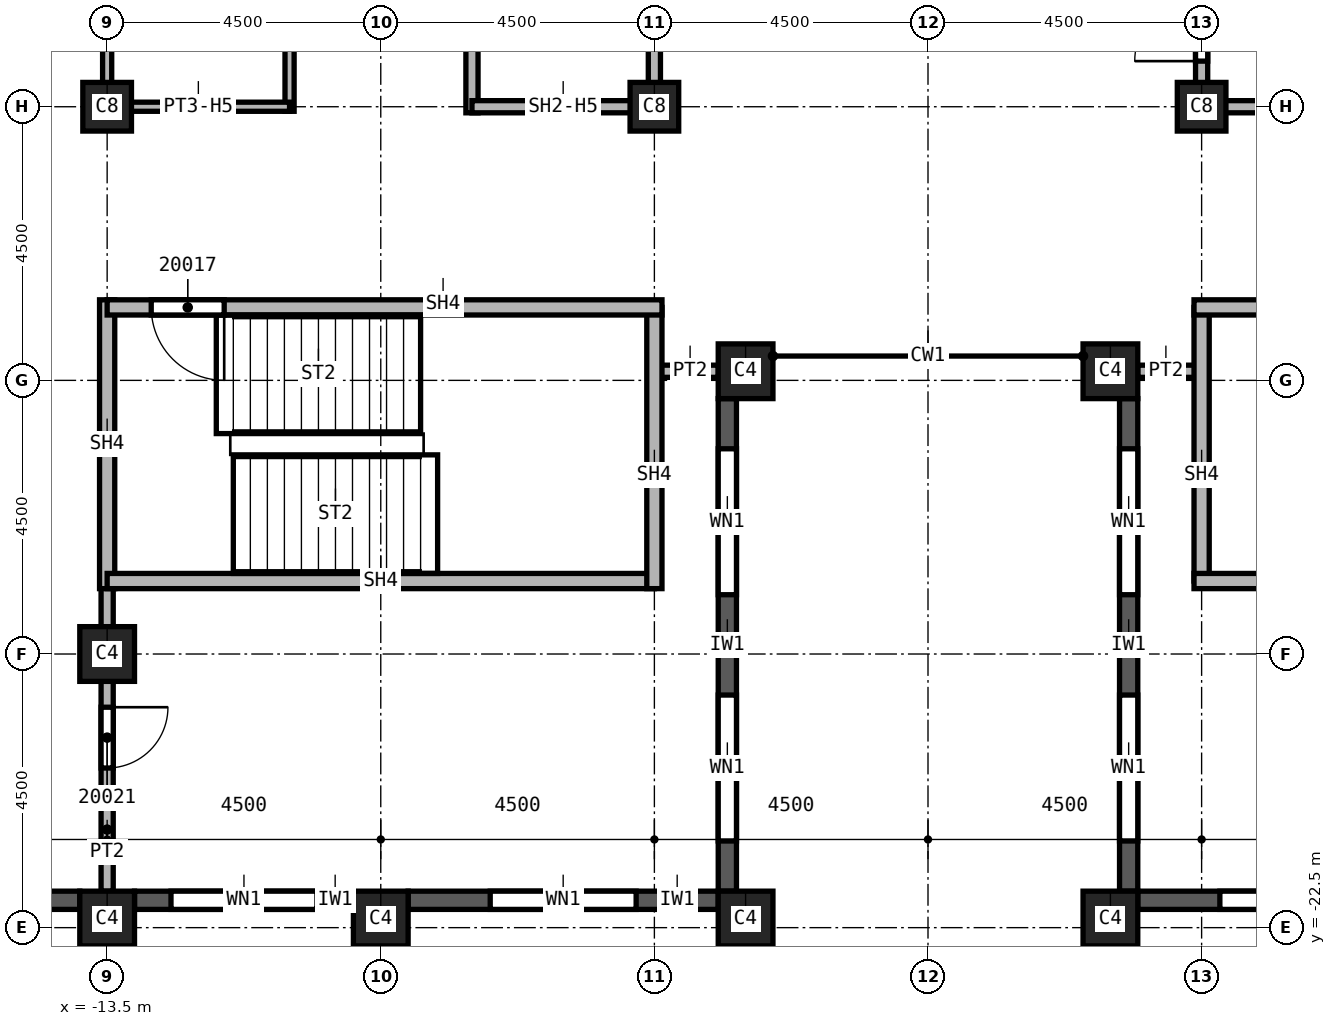
"""IFC4 building model, lengths in metres.
Left out: names, types, materials, properties, quantities, classifications, styles, units other than length and angle.
Written with IfcOpenShell. Run it as: python <this file> out.ifc"""

import sys

from ifc_helpers import new_model, si_unit, direction, frame, frame_2d, origin, origin_2d, place, context, subcontext, project, spatial, rectangle, extrude, element, fill, save


model = new_model("IFC4")
c1 = context("Model", 3, precision=1e-05, world=origin(), true_north=direction((0.0, 1.0)))
c2 = subcontext(c1, "Body", "Model", "MODEL_VIEW")
j1 = project(units=[si_unit("LENGTHUNIT", "METRE"), si_unit("PLANEANGLEUNIT", "RADIAN")], contexts=[c1])
p1 = place(None, origin())
s1 = spatial("IfcSite", under=j1, at=p1, CompositionType="ELEMENT")
p2 = place(p1, origin())
s2 = spatial("IfcBuilding", under=s1, at=p2, CompositionType="ELEMENT")
p3 = place(p2, frame((0.0, 0.0, 290.0)))
s3 = spatial("IfcBuildingStorey", under=s2, at=p3, CompositionType="ELEMENT", Elevation=290.0)
p4 = place(p3, frame((-13.5, -18.0, 0.0), z_axis=(0.0, 0.0, 1.0), x_axis=(1.0, 0.0, 0.0)))
e1 = element("IfcColumn", 1, at=p4, inside=s3, PredefinedType="COLUMN", context=c2, shape_type="SweptSolid", body=[
    extrude(rectangle(XDim=0.9, YDim=0.9, at=origin_2d()), origin(), (0.0, 0.0, 1.0), 3.59),
])
for number, where, z_axis, x_axis in (
    (2, (4.5, -9.0, 0.0), (0.0, 0.0, 1.0), (1.0, 0.0, 0.0)),
    (3, (-4.5, -9.0, 0.0), (0.0, 0.0, 1.0), (1.0, 0.0, 0.0)),
    (4, (-13.5, -9.0, 0.0), (0.0, 0.0, 1.0), (1.0, 0.0, 0.0)),
):
    element("IfcColumn", number, at=place(p3, frame(where, z_axis=z_axis, x_axis=x_axis)), inside=s3, PredefinedType="COLUMN", context=c2, shape_type="SweptSolid", body=[
        extrude(rectangle(XDim=0.8, YDim=0.8, at=origin_2d()), origin(), (0.0, 0.0, 1.0), 3.59),
    ])
for number, where, z_axis, x_axis in (
    (5, (3.0, -22.35, 0.0), (0.0, 0.0, 1.0), (1.0, 0.0, 0.0)),
    (6, (-3.0, -22.35, 0.0), (0.0, 0.0, 1.0), (1.0, 0.0, 0.0)),
    (7, (-9.0, -22.35, 0.0), (0.0, 0.0, 1.0), (1.0, 0.0, 0.0)),
    (8, (-13.5, -22.35, 0.0), (0.0, 0.0, 1.0), (1.0, 0.0, 0.0)),
    (9, (3.0, -13.35, 0.0), (0.0, 0.0, 1.0), (1.0, 0.0, 0.0)),
    (10, (-3.0, -13.35, 0.0), (0.0, 0.0, 1.0), (1.0, 0.0, 0.0)),
):
    element("IfcColumn", number, at=place(p3, frame(where, z_axis=z_axis, x_axis=x_axis)), inside=s3, PredefinedType="COLUMN", context=c2, shape_type="SweptSolid", body=[
        extrude(rectangle(XDim=0.9, YDim=0.9, at=origin_2d()), origin(), (0.0, 0.0, 1.0), 3.59),
    ])
p5 = place(p3, frame((-17.55, -22.05, 0.0), z_axis=(0.0, 0.0, 1.0), x_axis=(1.0, 0.0, 0.0)))
e11 = element("IfcWall", 11, at=p5, inside=s3, PredefinedType="SOLIDWALL", context=c2, shape_type="SweptSolid", body=[
    extrude(rectangle(XDim=3.6, YDim=0.3, at=frame_2d((1.8, 0.0))), origin(), (0.0, 0.0, 1.0), 2.99),
])
p6 = place(p5, frame((0.775, 0.0, 0.8)))
e12 = element("IfcOpeningElement", 12, at=p6, cuts=e11, PredefinedType="OPENING", context=c2, shape_type="SweptSolid", body=[
    extrude(rectangle(XDim=1.0, YDim=1.95, at=frame_2d((0.5, 0.975))), frame((0.0, 0.15, 0.0), z_axis=(0.0, -1.0, 0.0), x_axis=(1.0, 0.0, 0.0)), (0.0, 0.0, 1.0), 0.3),
])
p7 = place(p5, frame((2.375, 0.0, 0.8)))
e13 = element("IfcOpeningElement", 13, at=p7, cuts=e11, PredefinedType="OPENING", context=c2, shape_type="SweptSolid", body=[
    extrude(rectangle(XDim=0.6, YDim=1.95, at=frame_2d((0.3, 0.975))), frame((0.0, 0.15, 0.0), z_axis=(0.0, -1.0, 0.0), x_axis=(1.0, 0.0, 0.0)), (0.0, 0.0, 1.0), 0.3),
])
p8 = place(p3, frame((-13.05, -22.05, 0.0), z_axis=(0.0, 0.0, 1.0), x_axis=(1.0, 0.0, 0.0)))
e14 = element("IfcWall", 14, at=p8, inside=s3, PredefinedType="SOLIDWALL", context=c2, shape_type="SweptSolid", body=[
    extrude(rectangle(XDim=3.6, YDim=0.3, at=frame_2d((1.8, 0.0))), origin(), (0.0, 0.0, 1.0), 2.99),
])
p9 = place(p8, frame((0.6, 0.0, 0.8)))
e15 = element("IfcOpeningElement", 15, at=p9, cuts=e14, PredefinedType="OPENING", context=c2, shape_type="SweptSolid", body=[
    extrude(rectangle(XDim=2.4, YDim=1.95, at=frame_2d((1.2, 0.975))), frame((0.0, 0.15, 0.0), z_axis=(0.0, -1.0, 0.0), x_axis=(1.0, 0.0, 0.0)), (0.0, 0.0, 1.0), 0.3),
])
p10 = place(p3, frame((-8.55, -22.05, 0.0), z_axis=(0.0, 0.0, 1.0), x_axis=(1.0, 0.0, 0.0)))
e16 = element("IfcWall", 16, at=p10, inside=s3, PredefinedType="SOLIDWALL", context=c2, shape_type="SweptSolid", body=[
    extrude(rectangle(XDim=5.1, YDim=0.3, at=frame_2d((2.55, 0.0))), origin(), (0.0, 0.0, 1.0), 2.99),
])
p11 = place(p10, frame((1.35, 0.0, 0.8)))
e17 = element("IfcOpeningElement", 17, at=p11, cuts=e16, PredefinedType="OPENING", context=c2, shape_type="SweptSolid", body=[
    extrude(rectangle(XDim=2.4, YDim=1.95, at=frame_2d((1.2, 0.975))), frame((0.0, 0.15, 0.0), z_axis=(0.0, -1.0, 0.0), x_axis=(1.0, 0.0, 0.0)), (0.0, 0.0, 1.0), 0.3),
])
p12 = place(p3, frame((-3.3, -21.9, 0.0), z_axis=(0.0, 0.0, 1.0), x_axis=(0.0, 1.0, 0.0)))
e18 = element("IfcWall", 18, at=p12, inside=s3, PredefinedType="SOLIDWALL", context=c2, shape_type="SweptSolid", body=[
    extrude(rectangle(XDim=8.1, YDim=0.3, at=frame_2d((4.05, 0.0))), origin(), (0.0, 0.0, 1.0), 2.99),
])
p13 = place(p12, frame((0.825, 0.0, 0.8)))
e19 = element("IfcOpeningElement", 19, at=p13, cuts=e18, PredefinedType="OPENING", context=c2, shape_type="SweptSolid", body=[
    extrude(rectangle(XDim=2.4, YDim=1.95, at=frame_2d((1.2, 0.975))), frame((0.0, 0.15, 0.0), z_axis=(0.0, -1.0, 0.0), x_axis=(1.0, 0.0, 0.0)), (0.0, 0.0, 1.0), 0.3),
])
p14 = place(p12, frame((4.875, 0.0, 0.8)))
e20 = element("IfcOpeningElement", 20, at=p14, cuts=e18, PredefinedType="OPENING", context=c2, shape_type="SweptSolid", body=[
    extrude(rectangle(XDim=2.4, YDim=1.95, at=frame_2d((1.2, 0.975))), frame((0.0, 0.15, 0.0), z_axis=(0.0, -1.0, 0.0), x_axis=(1.0, 0.0, 0.0)), (0.0, 0.0, 1.0), 0.3),
])
p15 = place(p3, frame((3.3, -13.8, 0.0), z_axis=(0.0, 0.0, 1.0), x_axis=(0.0, -1.0, 0.0)))
e21 = element("IfcWall", 21, at=p15, inside=s3, PredefinedType="SOLIDWALL", context=c2, shape_type="SweptSolid", body=[
    extrude(rectangle(XDim=8.1, YDim=0.3, at=frame_2d((4.05, 0.0))), origin(), (0.0, 0.0, 1.0), 2.99),
])
p16 = place(p15, frame((0.825, 0.0, 0.8)))
e22 = element("IfcOpeningElement", 22, at=p16, cuts=e21, PredefinedType="OPENING", context=c2, shape_type="SweptSolid", body=[
    extrude(rectangle(XDim=2.4, YDim=1.95, at=frame_2d((1.2, 0.975))), frame((0.0, 0.15, 0.0), z_axis=(0.0, -1.0, 0.0), x_axis=(1.0, 0.0, 0.0)), (0.0, 0.0, 1.0), 0.3),
])
p17 = place(p15, frame((4.875, 0.0, 0.8)))
e23 = element("IfcOpeningElement", 23, at=p17, cuts=e21, PredefinedType="OPENING", context=c2, shape_type="SweptSolid", body=[
    extrude(rectangle(XDim=2.4, YDim=1.95, at=frame_2d((1.2, 0.975))), frame((0.0, 0.15, 0.0), z_axis=(0.0, -1.0, 0.0), x_axis=(1.0, 0.0, 0.0)), (0.0, 0.0, 1.0), 0.3),
])
p18 = place(p3, frame((3.45, -22.05, 0.0), z_axis=(0.0, 0.0, 1.0), x_axis=(1.0, 0.0, 0.0)))
e24 = element("IfcWall", 24, at=p18, inside=s3, PredefinedType="SOLIDWALL", context=c2, shape_type="SweptSolid", body=[
    extrude(rectangle(XDim=5.1, YDim=0.3, at=frame_2d((2.55, 0.0))), origin(), (0.0, 0.0, 1.0), 2.99),
])
p19 = place(p18, frame((1.35, 0.0, 0.8)))
e25 = element("IfcOpeningElement", 25, at=p19, cuts=e24, PredefinedType="OPENING", context=c2, shape_type="SweptSolid", body=[
    extrude(rectangle(XDim=2.4, YDim=1.95, at=frame_2d((1.2, 0.975))), frame((0.0, 0.15, 0.0), z_axis=(0.0, -1.0, 0.0), x_axis=(1.0, 0.0, 0.0)), (0.0, 0.0, 1.0), 0.3),
])
p20 = place(p3, frame((-13.5, -16.675, 0.0), z_axis=(0.0, 0.0, 1.0), x_axis=(0.0, -1.0, 0.0)))
e26 = element("IfcWall", 26, at=p20, inside=s3, PredefinedType="PARTITIONING", context=c2, shape_type="SweptSolid", body=[
    extrude(rectangle(XDim=5.225, YDim=0.2, at=frame_2d((2.612, 0.0))), origin(), (0.0, 0.0, 1.0), 3.59),
])
p21 = place(p20, frame((2.2, 0.0, 0.0)))
e27 = element("IfcOpeningElement", 27, at=p21, cuts=e26, PredefinedType="OPENING", context=c2, shape_type="SweptSolid", body=[
    extrude(rectangle(XDim=1.0, YDim=2.1, at=frame_2d((0.5, 1.05))), frame((0.0, 0.1, 0.0), z_axis=(0.0, -1.0, 0.0), x_axis=(1.0, 0.0, 0.0)), (0.0, 0.0, 1.0), 0.2),
])
for number, where, z_axis, x_axis in (
    (28, (-3.45, -13.35, 0.0), (0.0, 0.0, 1.0), (-1.0, 0.0, 0.0)),
    (29, (4.5, -13.35, 0.0), (0.0, 0.0, 1.0), (-1.0, 0.0, 0.0)),
):
    element("IfcWall", number, at=place(p3, frame(where, z_axis=z_axis, x_axis=x_axis)), inside=s3, PredefinedType="PARTITIONING", context=c2, shape_type="SweptSolid", body=[
        extrude(rectangle(XDim=1.05, YDim=0.2, at=frame_2d((0.525, 0.0))), origin(), (0.0, 0.0, 1.0), 3.59),
    ])
p22 = place(p3, frame((-7.5, -9.1, 0.0), z_axis=(0.0, 0.0, 1.0), x_axis=(0.0, 1.0, 0.0)))
e30 = element("IfcWall", 30, at=p22, inside=s3, PredefinedType="SOLIDWALL", context=c2, shape_type="SweptSolid", body=[
    extrude(rectangle(XDim=6.225, YDim=0.2, at=frame_2d((3.113, 0.0))), origin(), (0.0, 0.0, 1.0), 3.59),
])
p23 = place(p3, frame((-4.5, -9.0, 0.0), z_axis=(0.0, 0.0, 1.0), x_axis=(-1.0, 0.0, 0.0)))
e31 = element("IfcWall", 31, at=p23, inside=s3, PredefinedType="SOLIDWALL", context=c2, shape_type="SweptSolid", body=[
    extrude(rectangle(XDim=3.0, YDim=0.2, at=frame_2d((1.5, 0.0))), origin(), (0.0, 0.0, 1.0), 2.828),
])
p24 = place(p3, frame((-4.5, 0.0, 0.0), z_axis=(0.0, 0.0, 1.0), x_axis=(0.0, -1.0, 0.0)))
e32 = element("IfcWall", 32, at=p24, inside=s3, PredefinedType="SOLIDWALL", context=c2, shape_type="SweptSolid", body=[
    extrude(rectangle(XDim=9.1, YDim=0.2, at=frame_2d((4.55, 0.0))), origin(), (0.0, 0.0, 1.0), 2.828),
])
p25 = place(p24, frame((6.25, 0.0, 0.0)))
e33 = element("IfcOpeningElement", 33, at=p25, cuts=e32, PredefinedType="OPENING", context=c2, shape_type="SweptSolid", body=[
    extrude(rectangle(XDim=1.1, YDim=2.1, at=frame_2d((0.55, 1.05))), frame((0.0, 0.1, 0.0), z_axis=(0.0, -1.0, 0.0), x_axis=(1.0, 0.0, 0.0)), (0.0, 0.0, 1.0), 0.2),
])
p26 = place(p24, frame((4.6, 0.0, 0.0)))
e34 = element("IfcOpeningElement", 34, at=p26, cuts=e32, PredefinedType="OPENING", context=c2, shape_type="SweptSolid", body=[
    extrude(rectangle(XDim=1.1, YDim=2.1, at=frame_2d((0.55, 1.05))), frame((0.0, 0.1, 0.0), z_axis=(0.0, -1.0, 0.0), x_axis=(1.0, 0.0, 0.0)), (0.0, 0.0, 1.0), 0.2),
])
p27 = place(p3, frame((4.5, -9.1, 0.0), z_axis=(0.0, 0.0, 1.0), x_axis=(0.0, 1.0, 0.0)))
e35 = element("IfcWall", 35, at=p27, inside=s3, PredefinedType="SOLIDWALL", context=c2, shape_type="SweptSolid", body=[
    extrude(rectangle(XDim=3.1, YDim=0.2, at=frame_2d((1.55, 0.0))), origin(), (0.0, 0.0, 1.0), 2.828),
])
p28 = place(p27, frame((0.85, 0.0, 0.0)))
e36 = element("IfcOpeningElement", 36, at=p28, cuts=e35, PredefinedType="OPENING", context=c2, shape_type="SweptSolid", body=[
    extrude(rectangle(XDim=1.1, YDim=2.1, at=frame_2d((0.55, 1.05))), frame((0.0, 0.1, 0.0), z_axis=(0.0, -1.0, 0.0), x_axis=(1.0, 0.0, 0.0)), (0.0, 0.0, 1.0), 0.2),
])
p29 = place(p3, frame((7.5, -9.0, 0.0), z_axis=(0.0, 0.0, 1.0), x_axis=(-1.0, 0.0, 0.0)))
e37 = element("IfcWall", 37, at=p29, inside=s3, PredefinedType="SOLIDWALL", context=c2, shape_type="SweptSolid", body=[
    extrude(rectangle(XDim=3.0, YDim=0.2, at=frame_2d((1.5, 0.0))), origin(), (0.0, 0.0, 1.0), 2.828),
])
p30 = place(p3, frame((-13.5, -12.175, 0.0), z_axis=(0.0, 0.0, 1.0), x_axis=(0.0, -1.0, 0.0)))
e38 = element("IfcWall", 38, at=p30, inside=s3, PredefinedType="SOLIDWALL", context=c2, shape_type="SweptSolid", body=[
    extrude(rectangle(XDim=4.75, YDim=0.25, at=frame_2d((2.375, 0.0))), origin(), (0.0, 0.0, 1.0), 3.59),
])
p31 = place(p3, frame((-4.5, -16.8, 0.0), z_axis=(0.0, 0.0, 1.0), x_axis=(-1.0, 0.0, 0.0)))
e39 = element("IfcWall", 39, at=p31, inside=s3, PredefinedType="SOLIDWALL", context=c2, shape_type="SweptSolid", body=[
    extrude(rectangle(XDim=9.0, YDim=0.25, at=frame_2d((4.5, 0.0))), origin(), (0.0, 0.0, 1.0), 3.59),
])
p32 = place(p3, frame((-4.5, -12.3, 0.0), z_axis=(0.0, 0.0, 1.0), x_axis=(0.0, -1.0, 0.0)))
e40 = element("IfcWall", 40, at=p32, inside=s3, PredefinedType="SOLIDWALL", context=c2, shape_type="SweptSolid", body=[
    extrude(rectangle(XDim=4.625, YDim=0.25, at=frame_2d((2.312, 0.0))), origin(), (0.0, 0.0, 1.0), 3.59),
])
p33 = place(p3, frame((-4.375, -12.3, 0.0), z_axis=(0.0, 0.0, 1.0), x_axis=(-1.0, 0.0, 0.0)))
e41 = element("IfcWall", 41, at=p33, inside=s3, PredefinedType="SOLIDWALL", context=c2, shape_type="SweptSolid", body=[
    extrude(rectangle(XDim=9.125, YDim=0.25, at=frame_2d((4.562, 0.0))), origin(), (0.0, 0.0, 1.0), 3.59),
])
p34 = place(p33, frame((7.2, 0.0, 0.0)))
e42 = element("IfcOpeningElement", 42, at=p34, cuts=e41, PredefinedType="OPENING", context=c2, shape_type="SweptSolid", body=[
    extrude(rectangle(XDim=1.2, YDim=2.1, at=frame_2d((0.6, 1.05))), frame((0.0, 0.125, 0.0), z_axis=(0.0, -1.0, 0.0), x_axis=(1.0, 0.0, 0.0)), (0.0, 0.0, 1.0), 0.25),
])
p35 = place(p3, frame((4.5, -16.8, 0.0), z_axis=(0.0, 0.0, 1.0), x_axis=(0.0, 1.0, 0.0)))
e43 = element("IfcWall", 43, at=p35, inside=s3, PredefinedType="SOLIDWALL", context=c2, shape_type="SweptSolid", body=[
    extrude(rectangle(XDim=4.5, YDim=0.25, at=frame_2d((2.25, 0.0))), origin(), (0.0, 0.0, 1.0), 3.59),
])
p36 = place(p3, frame((13.5, -16.8, 0.0), z_axis=(0.0, 0.0, 1.0), x_axis=(-1.0, 0.0, 0.0)))
e44 = element("IfcWall", 44, at=p36, inside=s3, PredefinedType="SOLIDWALL", context=c2, shape_type="SweptSolid", body=[
    extrude(rectangle(XDim=9.125, YDim=0.25, at=frame_2d((4.562, 0.0))), origin(), (0.0, 0.0, 1.0), 3.59),
])
p37 = place(p3, frame((13.5, -12.3, 0.0), z_axis=(0.0, 0.0, 1.0), x_axis=(-1.0, 0.0, 0.0)))
e45 = element("IfcWall", 45, at=p37, inside=s3, PredefinedType="SOLIDWALL", context=c2, shape_type="SweptSolid", body=[
    extrude(rectangle(XDim=9.125, YDim=0.25, at=frame_2d((4.562, 0.0))), origin(), (0.0, 0.0, 1.0), 3.59),
])
p38 = place(p37, frame((0.6, 0.0, 0.0)))
e46 = element("IfcOpeningElement", 46, at=p38, cuts=e45, PredefinedType="OPENING", context=c2, shape_type="SweptSolid", body=[
    extrude(rectangle(XDim=1.2, YDim=2.1, at=frame_2d((0.6, 1.05))), frame((0.0, 0.125, 0.0), z_axis=(0.0, -1.0, 0.0), x_axis=(1.0, 0.0, 0.0)), (0.0, 0.0, 1.0), 0.25),
])
p39 = place(p3, frame((-13.5, -9.075, 0.0), z_axis=(0.0, 0.0, 1.0), x_axis=(0.0, 1.0, 0.0)))
e47 = element("IfcWall", 47, at=p39, inside=s3, PredefinedType="PARTITIONING", context=c2, shape_type="SweptSolid", body=[
    extrude(rectangle(XDim=4.575, YDim=0.15, at=frame_2d((2.288, 0.0))), origin(), (0.0, 0.0, 1.0), 2.828),
])
p40 = place(p3, frame((-10.5, -9.075, 0.0), z_axis=(0.0, 0.0, 1.0), x_axis=(0.0, 1.0, 0.0)))
e48 = element("IfcWall", 48, at=p40, inside=s3, PredefinedType="PARTITIONING", context=c2, shape_type="SweptSolid", body=[
    extrude(rectangle(XDim=4.65, YDim=0.15, at=frame_2d((2.325, 0.0))), origin(), (0.0, 0.0, 1.0), 3.59),
])
p41 = place(p40, frame((2.8, 0.0, 0.0)))
e49 = element("IfcOpeningElement", 49, at=p41, cuts=e48, PredefinedType="OPENING", context=c2, shape_type="SweptSolid", body=[
    extrude(rectangle(XDim=0.9, YDim=2.1, at=frame_2d((0.45, 1.05))), frame((0.0, 0.075, 0.0), z_axis=(0.0, -1.0, 0.0), x_axis=(1.0, 0.0, 0.0)), (0.0, 0.0, 1.0), 0.15),
])
p42 = place(p3, frame((-10.5, -9.0, 0.0), z_axis=(0.0, 0.0, 1.0), x_axis=(-1.0, 0.0, 0.0)))
e50 = element("IfcWall", 50, at=p42, inside=s3, PredefinedType="PARTITIONING", context=c2, shape_type="SweptSolid", body=[
    extrude(rectangle(XDim=3.0, YDim=0.15, at=frame_2d((1.5, 0.0))), origin(), (0.0, 0.0, 1.0), 2.828),
])
p43 = place(p9, origin())
e51 = element("IfcWindow", 51, at=p43, inside=s3, PartitioningType="SINGLE_PANEL", PredefinedType="WINDOW", context=c2, shape_type="SweptSolid", body=[
    extrude(rectangle(XDim=2.4, YDim=1.95, at=frame_2d((1.2, 0.975))), frame((0.0, 0.03, 0.0), z_axis=(0.0, -1.0, 0.0), x_axis=(1.0, 0.0, 0.0)), (0.0, 0.0, 1.0), 0.06),
])
fill(e15, e51)
p44 = place(p11, origin())
e52 = element("IfcWindow", 52, at=p44, inside=s3, PartitioningType="SINGLE_PANEL", PredefinedType="WINDOW", context=c2, shape_type="SweptSolid", body=[
    extrude(rectangle(XDim=2.4, YDim=1.95, at=frame_2d((1.2, 0.975))), frame((0.0, 0.03, 0.0), z_axis=(0.0, -1.0, 0.0), x_axis=(1.0, 0.0, 0.0)), (0.0, 0.0, 1.0), 0.06),
])
fill(e17, e52)
p45 = place(p13, origin())
e53 = element("IfcWindow", 53, at=p45, inside=s3, PartitioningType="SINGLE_PANEL", PredefinedType="WINDOW", context=c2, shape_type="SweptSolid", body=[
    extrude(rectangle(XDim=2.4, YDim=1.95, at=frame_2d((1.2, 0.975))), frame((0.0, 0.03, 0.0), z_axis=(0.0, -1.0, 0.0), x_axis=(1.0, 0.0, 0.0)), (0.0, 0.0, 1.0), 0.06),
])
fill(e19, e53)
p46 = place(p14, origin())
e54 = element("IfcWindow", 54, at=p46, inside=s3, PartitioningType="SINGLE_PANEL", PredefinedType="WINDOW", context=c2, shape_type="SweptSolid", body=[
    extrude(rectangle(XDim=2.4, YDim=1.95, at=frame_2d((1.2, 0.975))), frame((0.0, 0.03, 0.0), z_axis=(0.0, -1.0, 0.0), x_axis=(1.0, 0.0, 0.0)), (0.0, 0.0, 1.0), 0.06),
])
fill(e20, e54)
p47 = place(p16, origin())
e55 = element("IfcWindow", 55, at=p47, inside=s3, PartitioningType="SINGLE_PANEL", PredefinedType="WINDOW", context=c2, shape_type="SweptSolid", body=[
    extrude(rectangle(XDim=2.4, YDim=1.95, at=frame_2d((1.2, 0.975))), frame((0.0, 0.03, 0.0), z_axis=(0.0, -1.0, 0.0), x_axis=(1.0, 0.0, 0.0)), (0.0, 0.0, 1.0), 0.06),
])
fill(e22, e55)
p48 = place(p17, origin())
e56 = element("IfcWindow", 56, at=p48, inside=s3, PartitioningType="SINGLE_PANEL", PredefinedType="WINDOW", context=c2, shape_type="SweptSolid", body=[
    extrude(rectangle(XDim=2.4, YDim=1.95, at=frame_2d((1.2, 0.975))), frame((0.0, 0.03, 0.0), z_axis=(0.0, -1.0, 0.0), x_axis=(1.0, 0.0, 0.0)), (0.0, 0.0, 1.0), 0.06),
])
fill(e23, e56)
p49 = place(p19, origin())
e57 = element("IfcWindow", 57, at=p49, inside=s3, PartitioningType="SINGLE_PANEL", PredefinedType="WINDOW", context=c2, shape_type="SweptSolid", body=[
    extrude(rectangle(XDim=2.4, YDim=1.95, at=frame_2d((1.2, 0.975))), frame((0.0, 0.03, 0.0), z_axis=(0.0, -1.0, 0.0), x_axis=(1.0, 0.0, 0.0)), (0.0, 0.0, 1.0), 0.06),
])
fill(e25, e57)
p50 = place(p28, origin())
e58 = element("IfcDoor", 58, at=p50, inside=s3, OperationType="SINGLE_SWING_RIGHT", PredefinedType="DOOR", context=c2, shape_type="SweptSolid", body=[
    extrude(rectangle(XDim=1.1, YDim=2.1, at=frame_2d((0.55, 1.05))), frame((0.0, 0.025, 0.0), z_axis=(0.0, -1.0, 0.0), x_axis=(1.0, 0.0, 0.0)), (0.0, 0.0, 1.0), 0.05),
])
fill(e36, e58)
p51 = place(p34, origin())
e59 = element("IfcDoor", 59, at=p51, inside=s3, OperationType="SINGLE_SWING_RIGHT", PredefinedType="DOOR", context=c2, shape_type="SweptSolid", body=[
    extrude(rectangle(XDim=1.2, YDim=2.1, at=frame_2d((0.6, 1.05))), frame((0.0, 0.025, 0.0), z_axis=(0.0, -1.0, 0.0), x_axis=(1.0, 0.0, 0.0)), (0.0, 0.0, 1.0), 0.05),
])
fill(e42, e59)
p52 = place(p21, origin())
e60 = element("IfcDoor", 60, at=p52, inside=s3, OperationType="SINGLE_SWING_RIGHT", PredefinedType="DOOR", context=c2, shape_type="SweptSolid", body=[
    extrude(rectangle(XDim=1.0, YDim=2.1, at=frame_2d((0.5, 1.05))), frame((0.0, 0.025, 0.0), z_axis=(0.0, -1.0, 0.0), x_axis=(1.0, 0.0, 0.0)), (0.0, 0.0, 1.0), 0.05),
])
fill(e27, e60)
save(model, sys.argv[1])
